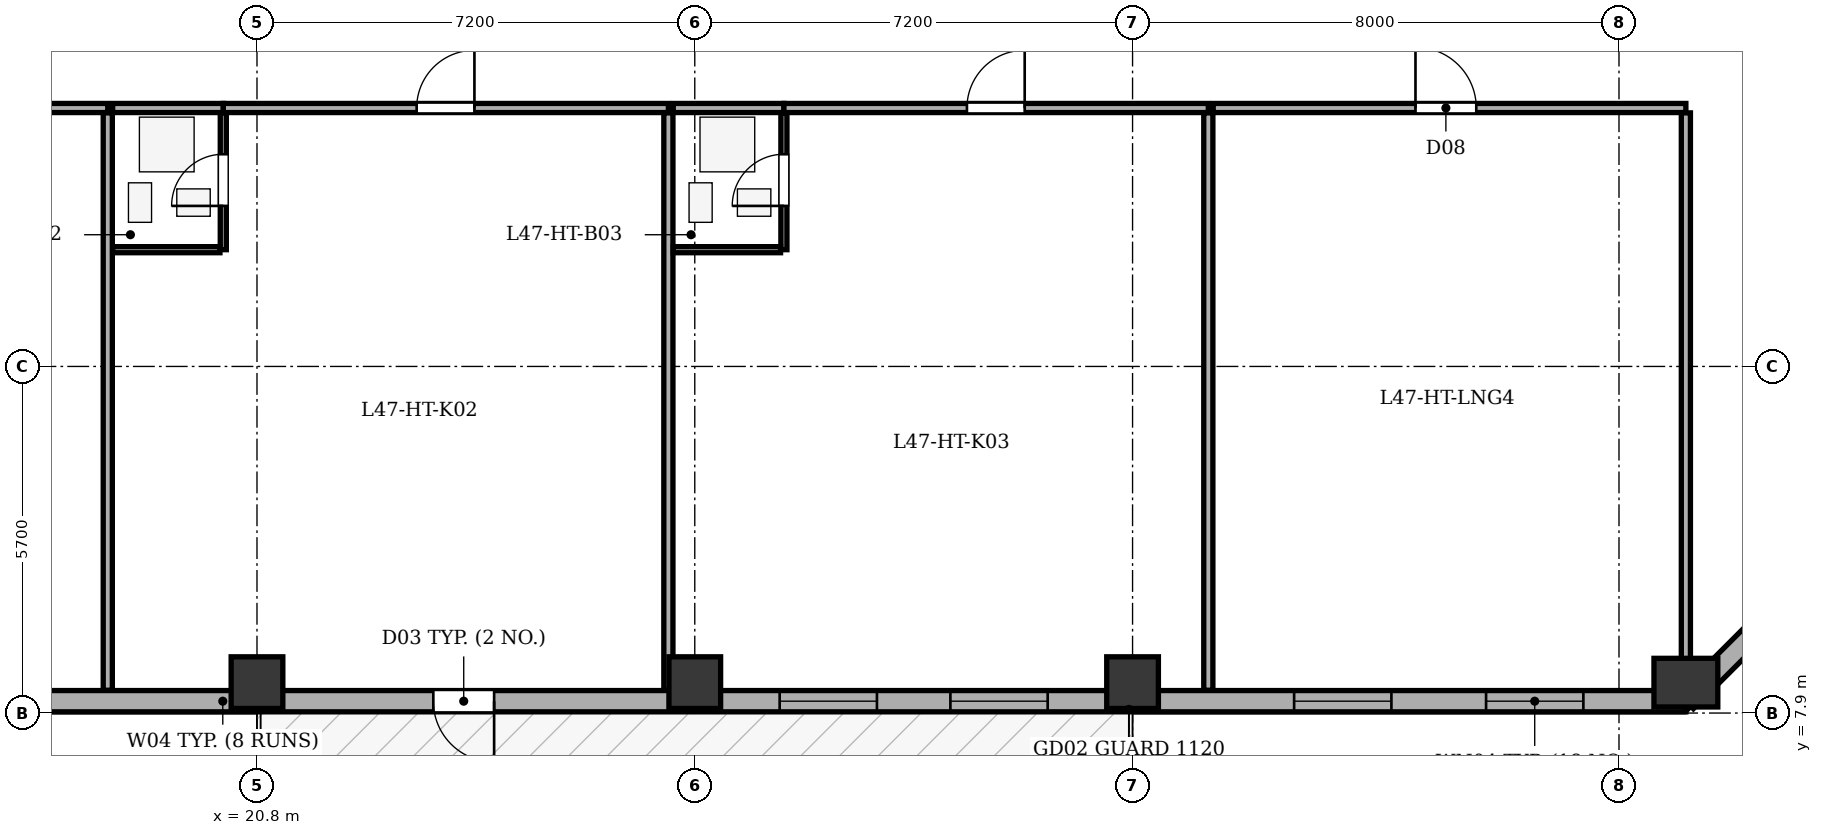
"""IFC4 building model, lengths in metres.
Left out: names, types, materials, properties, quantities, classifications, styles, units other than length and angle.
Written with IfcOpenShell. Run it as: python <this file> out.ifc"""

import sys

from ifc_helpers import new_model, si_unit, direction, frame, frame_2d, origin, origin_2d, place, context, subcontext, project, spatial, rectangle, extrude, element, fill, save


model = new_model("IFC4")
c1 = context("Model", 3, precision=1e-05, world=origin(), true_north=direction((0.0, 1.0)))
c2 = subcontext(c1, "Body", "Model", "MODEL_VIEW")
j1 = project(units=[si_unit("LENGTHUNIT", "METRE"), si_unit("PLANEANGLEUNIT", "RADIAN")], contexts=[c1])
p1 = place(None, origin())
s1 = spatial("IfcSite", under=j1, at=p1, CompositionType="ELEMENT")
p2 = place(p1, origin())
s2 = spatial("IfcBuilding", under=s1, at=p2, CompositionType="ELEMENT")
p3 = place(p2, frame((0.0, 0.0, 183.3)))
s3 = spatial("IfcBuildingStorey", under=s2, at=p3, CompositionType="ELEMENT", Elevation=183.3)
for number, where, z_axis, x_axis in (
    (1, (20.8, 8.4, 0.0), (0.0, 0.0, 1.0), (1.0, 0.0, 0.0)),
    (2, (28.0, 8.4, 0.0), (0.0, 0.0, 1.0), (1.0, 0.0, 0.0)),
    (3, (35.2, 8.4, 0.0), (0.0, 0.0, 1.0), (1.0, 0.0, 0.0)),
):
    element("IfcColumn", number, at=place(p3, frame(where, z_axis=z_axis, x_axis=x_axis)), inside=s3, PredefinedType="COLUMN", context=c2, shape_type="SweptSolid", body=[
        extrude(rectangle(XDim=0.85, YDim=0.85, at=origin_2d()), origin(), (0.0, 0.0, 1.0), 3.5),
    ])
p4 = place(p3, frame((44.3, 8.4, 0.0), z_axis=(0.0, 0.0, 1.0), x_axis=(1.0, 0.0, 0.0)))
e4 = element("IfcColumn", 4, at=p4, inside=s3, PredefinedType="COLUMN", context=c2, shape_type="SweptSolid", body=[
    extrude(rectangle(XDim=0.8, YDim=1.05, at=origin_2d()), origin(), (0.0, 0.0, 1.0), 3.5),
])
p5 = place(p3, frame((44.3, 8.095, 0.0), z_axis=(0.0, 0.0, 1.0), x_axis=(-1.0, 0.0, 0.0)))
e5 = element("IfcWall", 5, at=p5, inside=s3, PredefinedType="STANDARD", context=c2, shape_type="SweptSolid", body=[
    extrude(rectangle(XDim=35.0, YDim=0.35, at=frame_2d((17.5, 0.0))), origin(), (0.0, 0.0, 1.0), 2.785),
])
p6 = place(p5, frame((19.6, 0.0, 0.0)))
e6 = element("IfcOpeningElement", 6, at=p6, cuts=e5, PredefinedType="OPENING", context=c2, shape_type="SweptSolid", body=[
    extrude(rectangle(XDim=1.0, YDim=2.02, at=frame_2d((0.5, 1.01))), frame((0.0, 0.185, 0.0), z_axis=(0.0, -1.0, 0.0), x_axis=(1.0, 0.0, 0.0)), (0.0, 0.0, 1.0), 0.37),
])
p7 = place(p5, frame((1.686, 0.0, 0.75)))
e7 = element("IfcOpeningElement", 7, at=p7, cuts=e5, PredefinedType="OPENING", context=c2, shape_type="SweptSolid", body=[
    extrude(rectangle(XDim=1.6, YDim=1.75, at=frame_2d((0.8, 0.875))), frame((0.0, 0.185, 0.0), z_axis=(0.0, -1.0, 0.0), x_axis=(1.0, 0.0, 0.0)), (0.0, 0.0, 1.0), 0.37),
])
p8 = place(p5, frame((4.843, 0.0, 0.75)))
e8 = element("IfcOpeningElement", 8, at=p8, cuts=e5, PredefinedType="OPENING", context=c2, shape_type="SweptSolid", body=[
    extrude(rectangle(XDim=1.6, YDim=1.75, at=frame_2d((0.8, 0.875))), frame((0.0, 0.185, 0.0), z_axis=(0.0, -1.0, 0.0), x_axis=(1.0, 0.0, 0.0)), (0.0, 0.0, 1.0), 0.37),
])
p9 = place(p5, frame((10.496, 0.0, 0.75)))
e9 = element("IfcOpeningElement", 9, at=p9, cuts=e5, PredefinedType="OPENING", context=c2, shape_type="SweptSolid", body=[
    extrude(rectangle(XDim=1.6, YDim=1.75, at=frame_2d((0.8, 0.875))), frame((0.0, 0.185, 0.0), z_axis=(0.0, -1.0, 0.0), x_axis=(1.0, 0.0, 0.0)), (0.0, 0.0, 1.0), 0.37),
])
p10 = place(p5, frame((13.304, 0.0, 0.75)))
e10 = element("IfcOpeningElement", 10, at=p10, cuts=e5, PredefinedType="OPENING", context=c2, shape_type="SweptSolid", body=[
    extrude(rectangle(XDim=1.6, YDim=1.75, at=frame_2d((0.8, 0.875))), frame((0.0, 0.185, 0.0), z_axis=(0.0, -1.0, 0.0), x_axis=(1.0, 0.0, 0.0)), (0.0, 0.0, 1.0), 0.37),
])
p11 = place(p5, frame((27.525, 0.0, 0.75)))
e11 = element("IfcOpeningElement", 11, at=p11, cuts=e5, PredefinedType="OPENING", context=c2, shape_type="SweptSolid", body=[
    extrude(rectangle(XDim=1.6, YDim=1.75, at=frame_2d((0.8, 0.875))), frame((0.0, 0.185, 0.0), z_axis=(0.0, -1.0, 0.0), x_axis=(1.0, 0.0, 0.0)), (0.0, 0.0, 1.0), 0.37),
])
p12 = place(p5, frame((30.729, 0.0, 0.75)))
e12 = element("IfcOpeningElement", 12, at=p12, cuts=e5, PredefinedType="OPENING", context=c2, shape_type="SweptSolid", body=[
    extrude(rectangle(XDim=2.1, YDim=1.75, at=frame_2d((1.05, 0.875))), frame((0.0, 0.185, 0.0), z_axis=(0.0, -1.0, 0.0), x_axis=(1.0, 0.0, 0.0)), (0.0, 0.0, 1.0), 0.37),
])
p13 = place(p3, frame((49.105, 12.9, 0.0), z_axis=(0.0, 0.0, 1.0), x_axis=(-0.707106781187, -0.707106781187, 0.0)))
e13 = element("IfcWall", 13, at=p13, inside=s3, PredefinedType="STANDARD", context=c2, shape_type="SweptSolid", body=[
    extrude(rectangle(XDim=6.795, YDim=0.35, at=frame_2d((3.397, 0.0))), origin(), (0.0, 0.0, 1.0), 2.785),
])
p14 = place(p13, frame((2.698, 0.0, 0.75)))
e14 = element("IfcOpeningElement", 14, at=p14, cuts=e13, PredefinedType="OPENING", context=c2, shape_type="SweptSolid", body=[
    extrude(rectangle(XDim=1.4, YDim=1.65, at=frame_2d((0.7, 0.825))), frame((0.0, 0.185, 0.0), z_axis=(0.0, -1.0, 0.0), x_axis=(1.0, 0.0, 0.0)), (0.0, 0.0, 1.0), 0.37),
])
p15 = place(p3, frame((12.05, 17.85, 0.0), z_axis=(0.0, 0.0, 1.0), x_axis=(1.0, 0.0, 0.0)))
e15 = element("IfcWall", 15, at=p15, inside=s3, PredefinedType="PARTITIONING", context=c2, shape_type="SweptSolid", body=[
    extrude(rectangle(XDim=6.296, YDim=0.15, at=frame_2d((3.148, 0.0))), origin(), (0.0, 0.0, 1.0), 3.2),
])
p16 = place(p15, frame((2.668, 0.0, 0.0)))
e16 = element("IfcOpeningElement", 16, at=p16, cuts=e15, PredefinedType="OPENING", context=c2, shape_type="SweptSolid", body=[
    extrude(rectangle(XDim=0.95, YDim=2.1, at=frame_2d((0.475, 1.05))), frame((0.0, 0.085, 0.0), z_axis=(0.0, -1.0, 0.0), x_axis=(1.0, 0.0, 0.0)), (0.0, 0.0, 1.0), 0.17),
])
p17 = place(p3, frame((18.346, 8.275, 0.0), z_axis=(0.0, 0.0, 1.0), x_axis=(0.0, 1.0, 0.0)))
e17 = element("IfcWall", 17, at=p17, inside=s3, PredefinedType="PARTITIONING", context=c2, shape_type="SweptSolid", body=[
    extrude(rectangle(XDim=9.495, YDim=0.15, at=frame_2d((4.748, 0.0))), origin(), (0.0, 0.0, 1.0), 3.2),
])
p18 = place(p3, frame((18.426, 17.85, 0.0), z_axis=(0.0, 0.0, 1.0), x_axis=(1.0, 0.0, 0.0)))
e18 = element("IfcWall", 18, at=p18, inside=s3, PredefinedType="PARTITIONING", context=c2, shape_type="SweptSolid", body=[
    extrude(rectangle(XDim=1.82, YDim=0.15, at=frame_2d((0.91, 0.0))), origin(), (0.0, 0.0, 1.0), 3.2),
])
p19 = place(p3, frame((20.246, 17.85, 0.0), z_axis=(0.0, 0.0, 1.0), x_axis=(1.0, 0.0, 0.0)))
e19 = element("IfcWall", 19, at=p19, inside=s3, PredefinedType="PARTITIONING", context=c2, shape_type="SweptSolid", body=[
    extrude(rectangle(XDim=7.32, YDim=0.15, at=frame_2d((3.66, 0.0))), origin(), (0.0, 0.0, 1.0), 3.2),
])
p20 = place(p19, frame((3.18, 0.0, 0.0)))
e20 = element("IfcOpeningElement", 20, at=p20, cuts=e19, PredefinedType="OPENING", context=c2, shape_type="SweptSolid", body=[
    extrude(rectangle(XDim=0.95, YDim=2.1, at=frame_2d((0.475, 1.05))), frame((0.0, 0.085, 0.0), z_axis=(0.0, -1.0, 0.0), x_axis=(1.0, 0.0, 0.0)), (0.0, 0.0, 1.0), 0.17),
])
p21 = place(p3, frame((20.246, 15.52, 0.0), z_axis=(0.0, 0.0, 1.0), x_axis=(0.0, 1.0, 0.0)))
e21 = element("IfcWall", 21, at=p21, inside=s3, PredefinedType="PARTITIONING", context=c2, shape_type="SweptSolid", body=[
    extrude(rectangle(XDim=2.25, YDim=0.1, at=frame_2d((1.125, 0.0))), origin(), (0.0, 0.0, 1.0), 3.2),
])
p22 = place(p21, frame((0.72, 0.0, 0.0)))
e22 = element("IfcOpeningElement", 22, at=p22, cuts=e21, PredefinedType="OPENING", context=c2, shape_type="SweptSolid", body=[
    extrude(rectangle(XDim=0.85, YDim=2.05, at=frame_2d((0.425, 1.025))), frame((0.0, 0.06, 0.0), z_axis=(0.0, -1.0, 0.0), x_axis=(1.0, 0.0, 0.0)), (0.0, 0.0, 1.0), 0.12),
])
p23 = place(p3, frame((18.426, 15.52, 0.0), z_axis=(0.0, 0.0, 1.0), x_axis=(1.0, 0.0, 0.0)))
e23 = element("IfcWall", 23, at=p23, inside=s3, PredefinedType="PARTITIONING", context=c2, shape_type="SweptSolid", body=[
    extrude(rectangle(XDim=1.765, YDim=0.1, at=frame_2d((0.882, 0.0))), origin(), (0.0, 0.0, 1.0), 3.2),
])
p24 = place(p3, frame((27.566, 8.275, 0.0), z_axis=(0.0, 0.0, 1.0), x_axis=(0.0, 1.0, 0.0)))
e24 = element("IfcWall", 24, at=p24, inside=s3, PredefinedType="PARTITIONING", context=c2, shape_type="SweptSolid", body=[
    extrude(rectangle(XDim=9.495, YDim=0.15, at=frame_2d((4.748, 0.0))), origin(), (0.0, 0.0, 1.0), 3.2),
])
p25 = place(p3, frame((27.646, 17.85, 0.0), z_axis=(0.0, 0.0, 1.0), x_axis=(1.0, 0.0, 0.0)))
e25 = element("IfcWall", 25, at=p25, inside=s3, PredefinedType="PARTITIONING", context=c2, shape_type="SweptSolid", body=[
    extrude(rectangle(XDim=1.82, YDim=0.15, at=frame_2d((0.91, 0.0))), origin(), (0.0, 0.0, 1.0), 3.2),
])
p26 = place(p3, frame((29.466, 17.85, 0.0), z_axis=(0.0, 0.0, 1.0), x_axis=(1.0, 0.0, 0.0)))
e26 = element("IfcWall", 26, at=p26, inside=s3, PredefinedType="PARTITIONING", context=c2, shape_type="SweptSolid", body=[
    extrude(rectangle(XDim=6.98, YDim=0.15, at=frame_2d((3.49, 0.0))), origin(), (0.0, 0.0, 1.0), 3.2),
])
p27 = place(p26, frame((3.01, 0.0, 0.0)))
e27 = element("IfcOpeningElement", 27, at=p27, cuts=e26, PredefinedType="OPENING", context=c2, shape_type="SweptSolid", body=[
    extrude(rectangle(XDim=0.95, YDim=2.1, at=frame_2d((0.475, 1.05))), frame((0.0, 0.085, 0.0), z_axis=(0.0, -1.0, 0.0), x_axis=(1.0, 0.0, 0.0)), (0.0, 0.0, 1.0), 0.17),
])
p28 = place(p3, frame((29.466, 15.52, 0.0), z_axis=(0.0, 0.0, 1.0), x_axis=(0.0, 1.0, 0.0)))
e28 = element("IfcWall", 28, at=p28, inside=s3, PredefinedType="PARTITIONING", context=c2, shape_type="SweptSolid", body=[
    extrude(rectangle(XDim=2.25, YDim=0.1, at=frame_2d((1.125, 0.0))), origin(), (0.0, 0.0, 1.0), 3.2),
])
p29 = place(p28, frame((0.72, 0.0, 0.0)))
e29 = element("IfcOpeningElement", 29, at=p29, cuts=e28, PredefinedType="OPENING", context=c2, shape_type="SweptSolid", body=[
    extrude(rectangle(XDim=0.85, YDim=2.05, at=frame_2d((0.425, 1.025))), frame((0.0, 0.06, 0.0), z_axis=(0.0, -1.0, 0.0), x_axis=(1.0, 0.0, 0.0)), (0.0, 0.0, 1.0), 0.12),
])
p30 = place(p3, frame((27.646, 15.52, 0.0), z_axis=(0.0, 0.0, 1.0), x_axis=(1.0, 0.0, 0.0)))
e30 = element("IfcWall", 30, at=p30, inside=s3, PredefinedType="PARTITIONING", context=c2, shape_type="SweptSolid", body=[
    extrude(rectangle(XDim=1.765, YDim=0.1, at=frame_2d((0.882, 0.0))), origin(), (0.0, 0.0, 1.0), 3.2),
])
p31 = place(p3, frame((36.446, 8.275, 0.0), z_axis=(0.0, 0.0, 1.0), x_axis=(0.0, 1.0, 0.0)))
e31 = element("IfcWall", 31, at=p31, inside=s3, PredefinedType="PARTITIONING", context=c2, shape_type="SweptSolid", body=[
    extrude(rectangle(XDim=9.495, YDim=0.15, at=frame_2d((4.748, 0.0))), origin(), (0.0, 0.0, 1.0), 3.2),
])
p32 = place(p3, frame((36.526, 17.85, 0.0), z_axis=(0.0, 0.0, 1.0), x_axis=(1.0, 0.0, 0.0)))
e32 = element("IfcWall", 32, at=p32, inside=s3, PredefinedType="PARTITIONING", context=c2, shape_type="SweptSolid", body=[
    extrude(rectangle(XDim=7.774, YDim=0.15, at=frame_2d((3.887, 0.0))), origin(), (0.0, 0.0, 1.0), 3.2),
])
p33 = place(p32, frame((3.327, 0.0, 0.0)))
e33 = element("IfcOpeningElement", 33, at=p33, cuts=e32, PredefinedType="OPENING", context=c2, shape_type="SweptSolid", body=[
    extrude(rectangle(XDim=1.0, YDim=2.1, at=frame_2d((0.5, 1.05))), frame((0.0, 0.085, 0.0), z_axis=(0.0, -1.0, 0.0), x_axis=(1.0, 0.0, 0.0)), (0.0, 0.0, 1.0), 0.17),
])
p34 = place(p3, frame((44.3, 8.275, 0.0), z_axis=(0.0, 0.0, 1.0), x_axis=(0.0, 1.0, 0.0)))
e34 = element("IfcWall", 34, at=p34, inside=s3, PredefinedType="PARTITIONING", context=c2, shape_type="SweptSolid", body=[
    extrude(rectangle(XDim=9.495, YDim=0.15, at=frame_2d((4.748, 0.0))), origin(), (0.0, 0.0, 1.0), 3.2),
])
p35 = place(p6, origin())
e35 = element("IfcDoor", 35, at=p35, inside=s3, OperationType="SINGLE_SWING_LEFT", PredefinedType="DOOR", context=c2, shape_type="SweptSolid", body=[
    extrude(rectangle(XDim=1.0, YDim=2.02, at=frame_2d((0.5, 1.01))), frame((0.0, 0.025, 0.0), z_axis=(0.0, -1.0, 0.0), x_axis=(1.0, 0.0, 0.0)), (0.0, 0.0, 1.0), 0.05),
])
fill(e6, e35)
p36 = place(p7, origin())
e36 = element("IfcWindow", 36, at=p36, inside=s3, PartitioningType="SINGLE_PANEL", PredefinedType="WINDOW", context=c2, shape_type="SweptSolid", body=[
    extrude(rectangle(XDim=1.6, YDim=1.75, at=frame_2d((0.8, 0.875))), frame((0.0, -0.01, 0.0), z_axis=(0.0, -1.0, 0.0), x_axis=(1.0, 0.0, 0.0)), (0.0, 0.0, 1.0), 0.06),
])
fill(e7, e36)
p37 = place(p8, origin())
e37 = element("IfcWindow", 37, at=p37, inside=s3, PartitioningType="SINGLE_PANEL", PredefinedType="WINDOW", context=c2, shape_type="SweptSolid", body=[
    extrude(rectangle(XDim=1.6, YDim=1.75, at=frame_2d((0.8, 0.875))), frame((0.0, -0.01, 0.0), z_axis=(0.0, -1.0, 0.0), x_axis=(1.0, 0.0, 0.0)), (0.0, 0.0, 1.0), 0.06),
])
fill(e8, e37)
p38 = place(p9, origin())
e38 = element("IfcWindow", 38, at=p38, inside=s3, PartitioningType="SINGLE_PANEL", PredefinedType="WINDOW", context=c2, shape_type="SweptSolid", body=[
    extrude(rectangle(XDim=1.6, YDim=1.75, at=frame_2d((0.8, 0.875))), frame((0.0, -0.01, 0.0), z_axis=(0.0, -1.0, 0.0), x_axis=(1.0, 0.0, 0.0)), (0.0, 0.0, 1.0), 0.06),
])
fill(e9, e38)
p39 = place(p10, origin())
e39 = element("IfcWindow", 39, at=p39, inside=s3, PartitioningType="SINGLE_PANEL", PredefinedType="WINDOW", context=c2, shape_type="SweptSolid", body=[
    extrude(rectangle(XDim=1.6, YDim=1.75, at=frame_2d((0.8, 0.875))), frame((0.0, -0.01, 0.0), z_axis=(0.0, -1.0, 0.0), x_axis=(1.0, 0.0, 0.0)), (0.0, 0.0, 1.0), 0.06),
])
fill(e10, e39)
p40 = place(p22, origin())
e40 = element("IfcDoor", 40, at=p40, inside=s3, OperationType="SINGLE_SWING_LEFT", PredefinedType="DOOR", context=c2, shape_type="SweptSolid", body=[
    extrude(rectangle(XDim=0.85, YDim=2.05, at=frame_2d((0.425, 1.025))), frame((0.0, 0.025, 0.0), z_axis=(0.0, -1.0, 0.0), x_axis=(1.0, 0.0, 0.0)), (0.0, 0.0, 1.0), 0.05),
])
fill(e22, e40)
p41 = place(p20, origin())
e41 = element("IfcDoor", 41, at=p41, inside=s3, OperationType="SINGLE_SWING_RIGHT", PredefinedType="DOOR", context=c2, shape_type="SweptSolid", body=[
    extrude(rectangle(XDim=0.95, YDim=2.1, at=frame_2d((0.475, 1.05))), frame((0.0, 0.025, 0.0), z_axis=(0.0, -1.0, 0.0), x_axis=(1.0, 0.0, 0.0)), (0.0, 0.0, 1.0), 0.05),
])
fill(e20, e41)
p42 = place(p29, origin())
e42 = element("IfcDoor", 42, at=p42, inside=s3, OperationType="SINGLE_SWING_LEFT", PredefinedType="DOOR", context=c2, shape_type="SweptSolid", body=[
    extrude(rectangle(XDim=0.85, YDim=2.05, at=frame_2d((0.425, 1.025))), frame((0.0, 0.025, 0.0), z_axis=(0.0, -1.0, 0.0), x_axis=(1.0, 0.0, 0.0)), (0.0, 0.0, 1.0), 0.05),
])
fill(e29, e42)
p43 = place(p27, origin())
e43 = element("IfcDoor", 43, at=p43, inside=s3, OperationType="SINGLE_SWING_RIGHT", PredefinedType="DOOR", context=c2, shape_type="SweptSolid", body=[
    extrude(rectangle(XDim=0.95, YDim=2.1, at=frame_2d((0.475, 1.05))), frame((0.0, 0.025, 0.0), z_axis=(0.0, -1.0, 0.0), x_axis=(1.0, 0.0, 0.0)), (0.0, 0.0, 1.0), 0.05),
])
fill(e27, e43)
p44 = place(p33, origin())
e44 = element("IfcDoor", 44, at=p44, inside=s3, OperationType="SINGLE_SWING_LEFT", PredefinedType="DOOR", context=c2, shape_type="SweptSolid", body=[
    extrude(rectangle(XDim=1.0, YDim=2.1, at=frame_2d((0.5, 1.05))), frame((0.0, 0.025, 0.0), z_axis=(0.0, -1.0, 0.0), x_axis=(1.0, 0.0, 0.0)), (0.0, 0.0, 1.0), 0.05),
])
fill(e33, e44)
save(model, sys.argv[1])
